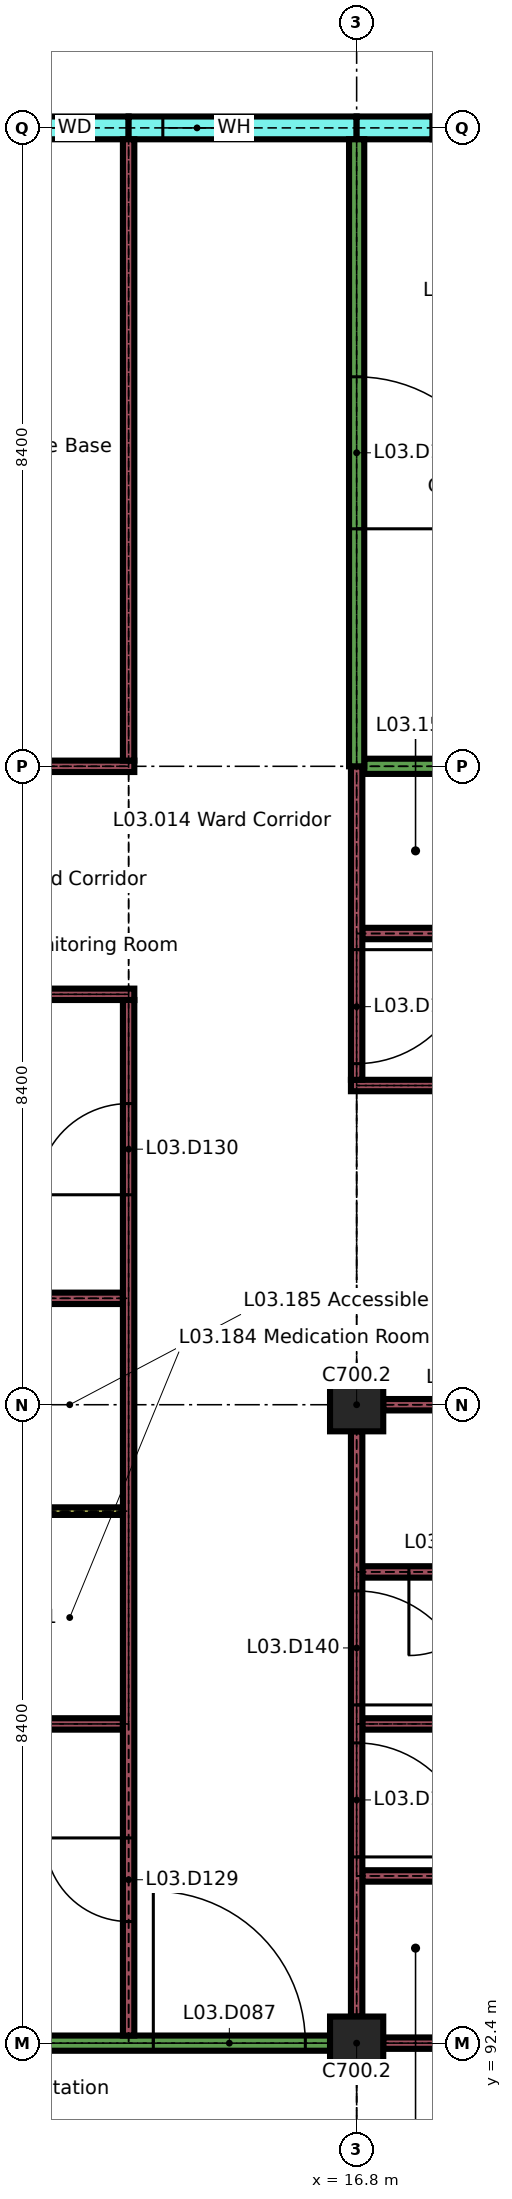
"""IFC4 building model, lengths in metres.
Left out: names, types, materials, properties, quantities, classifications, styles, units other than length and angle.
Written with IfcOpenShell. Run it as: python <this file> out.ifc"""

import sys

from ifc_helpers import new_model, si_unit, direction, frame, frame_2d, origin, origin_2d, place, context, subcontext, project, spatial, rectangle, extrude, element, fill, save


model = new_model("IFC4")
c1 = context("Model", 3, precision=1e-05, world=origin(), true_north=direction((0.0, 1.0)))
c2 = subcontext(c1, "Body", "Model", "MODEL_VIEW")
j1 = project(units=[si_unit("LENGTHUNIT", "METRE"), si_unit("PLANEANGLEUNIT", "RADIAN")], contexts=[c1])
p1 = place(None, origin())
s1 = spatial("IfcSite", under=j1, at=p1, CompositionType="ELEMENT")
p2 = place(p1, origin())
s2 = spatial("IfcBuilding", under=s1, at=p2, CompositionType="ELEMENT")
p3 = place(p2, frame((0.0, 0.0, 15.3)))
s3 = spatial("IfcBuildingStorey", under=s2, at=p3, CompositionType="ELEMENT", Elevation=15.3)
for number, where, z_axis, x_axis in (
    (1, (16.8, 92.4, 0.0), (0.0, 0.0, 1.0), (1.0, 0.0, 0.0)),
    (2, (16.8, 100.8, 0.0), (0.0, 0.0, 1.0), (1.0, 0.0, 0.0)),
):
    element("IfcColumn", number, at=place(p3, frame(where, z_axis=z_axis, x_axis=x_axis)), inside=s3, PredefinedType="COLUMN", context=c2, shape_type="SweptSolid", body=[
        extrude(rectangle(XDim=0.7, YDim=0.7, at=origin_2d()), origin(), (0.0, 0.0, 1.0), 3.26),
    ])
p4 = place(p3, frame((11.4, 117.6, 0.0), z_axis=(0.0, 0.0, 1.0), x_axis=(1.0, 0.0, 0.0)))
e3 = element("IfcWall", 3, at=p4, inside=s3, PredefinedType="SOLIDWALL", context=c2, shape_type="SweptSolid", body=[
    extrude(rectangle(XDim=2.4, YDim=0.3, at=frame_2d((1.2, 0.0))), origin(), (0.0, 0.0, 1.0), 3.26),
])
p5 = place(p4, frame((0.6, 0.0, 0.9)))
e4 = element("IfcOpeningElement", 4, at=p5, cuts=e3, PredefinedType="OPENING", context=c2, shape_type="SweptSolid", body=[
    extrude(rectangle(XDim=1.2, YDim=1.5, at=frame_2d((0.6, 0.75))), frame((0.0, 0.16, 0.0), z_axis=(0.0, -1.0, 0.0), x_axis=(1.0, 0.0, 0.0)), (0.0, 0.0, 1.0), 0.32),
])
p6 = place(p3, frame((13.8, 117.6, 0.0), z_axis=(0.0, 0.0, 1.0), x_axis=(1.0, 0.0, 0.0)))
e5 = element("IfcWall", 5, at=p6, inside=s3, PredefinedType="SOLIDWALL", context=c2, shape_type="SweptSolid", body=[
    extrude(rectangle(XDim=3.0, YDim=0.3, at=frame_2d((1.5, 0.0))), origin(), (0.0, 0.0, 1.0), 3.26),
])
p7 = place(p6, frame((0.45, 0.0, 0.9)))
e6 = element("IfcOpeningElement", 6, at=p7, cuts=e5, PredefinedType="OPENING", context=c2, shape_type="SweptSolid", body=[
    extrude(rectangle(XDim=0.9, YDim=1.5, at=frame_2d((0.45, 0.75))), frame((0.0, 0.16, 0.0), z_axis=(0.0, -1.0, 0.0), x_axis=(1.0, 0.0, 0.0)), (0.0, 0.0, 1.0), 0.32),
])
p8 = place(p3, frame((16.8, 117.6, 0.0), z_axis=(0.0, 0.0, 1.0), x_axis=(1.0, 0.0, 0.0)))
e7 = element("IfcWall", 7, at=p8, inside=s3, PredefinedType="SOLIDWALL", context=c2, shape_type="SweptSolid", body=[
    extrude(rectangle(XDim=1.0, YDim=0.3, at=frame_2d((0.5, 0.0))), origin(), (0.0, 0.0, 1.0), 3.26),
])
p9 = place(p3, frame((17.8, 117.6, 0.0), z_axis=(0.0, 0.0, 1.0), x_axis=(1.0, 0.0, 0.0)))
e8 = element("IfcWall", 8, at=p9, inside=s3, PredefinedType="SOLIDWALL", context=c2, shape_type="SweptSolid", body=[
    extrude(rectangle(XDim=2.8, YDim=0.3, at=frame_2d((1.4, 0.0))), origin(), (0.0, 0.0, 1.0), 0.6),
])
p10 = place(p3, frame((8.75, 92.4, 0.0), z_axis=(0.0, 0.0, 1.0), x_axis=(1.0, 0.0, 0.0)))
e9 = element("IfcWall", 9, at=p10, inside=s3, PredefinedType="PARTITIONING", context=c2, shape_type="SweptSolid", body=[
    extrude(rectangle(XDim=7.7, YDim=0.2, at=frame_2d((3.85, 0.0))), origin(), (0.0, 0.0, 1.0), 3.26),
])
p11 = place(p10, frame((0.325, 0.0, 0.0)))
e10 = element("IfcOpeningElement", 10, at=p11, cuts=e9, PredefinedType="OPENING", context=c2, shape_type="SweptSolid", body=[
    extrude(rectangle(XDim=2.0, YDim=2.4, at=frame_2d((1.0, 1.2))), frame((0.0, 0.11, 0.0), z_axis=(0.0, -1.0, 0.0), x_axis=(1.0, 0.0, 0.0)), (0.0, 0.0, 1.0), 0.22),
])
p12 = place(p10, frame((5.375, 0.0, 0.0)))
e11 = element("IfcOpeningElement", 11, at=p12, cuts=e9, PredefinedType="OPENING", context=c2, shape_type="SweptSolid", body=[
    extrude(rectangle(XDim=2.0, YDim=2.4, at=frame_2d((1.0, 1.2))), frame((0.0, 0.11, 0.0), z_axis=(0.0, -1.0, 0.0), x_axis=(1.0, 0.0, 0.0)), (0.0, 0.0, 1.0), 0.22),
])
p13 = place(p3, frame((17.15, 92.4, 0.0), z_axis=(0.0, 0.0, 1.0), x_axis=(1.0, 0.0, 0.0)))
e12 = element("IfcWall", 12, at=p13, inside=s3, PredefinedType="PARTITIONING", context=c2, shape_type="SweptSolid", body=[
    extrude(rectangle(XDim=7.7, YDim=0.15, at=frame_2d((3.85, 0.0))), origin(), (0.0, 0.0, 1.0), 3.26),
])
p14 = place(p3, frame((16.875, 94.6, 0.0), z_axis=(0.0, 0.0, 1.0), x_axis=(1.0, 0.0, 0.0)))
e13 = element("IfcWall", 13, at=p14, inside=s3, PredefinedType="PARTITIONING", context=c2, shape_type="SweptSolid", body=[
    extrude(rectangle(XDim=2.4, YDim=0.15, at=frame_2d((1.2, 0.0))), origin(), (0.0, 0.0, 1.0), 3.26),
])
p15 = place(p3, frame((11.475, 96.6, 0.0), z_axis=(0.0, 0.0, 1.0), x_axis=(1.0, 0.0, 0.0)))
e14 = element("IfcWall", 14, at=p15, inside=s3, PredefinedType="PARTITIONING", context=c2, shape_type="SweptSolid", body=[
    extrude(rectangle(XDim=2.25, YDim=0.15, at=frame_2d((1.125, 0.0))), origin(), (0.0, 0.0, 1.0), 3.26),
])
p16 = place(p3, frame((16.875, 96.6, 0.0), z_axis=(0.0, 0.0, 1.0), x_axis=(1.0, 0.0, 0.0)))
e15 = element("IfcWall", 15, at=p16, inside=s3, PredefinedType="PARTITIONING", context=c2, shape_type="SweptSolid", body=[
    extrude(rectangle(XDim=8.175, YDim=0.15, at=frame_2d((4.087, 0.0))), origin(), (0.0, 0.0, 1.0), 3.26),
])
p17 = place(p3, frame((16.875, 98.6, 0.0), z_axis=(0.0, 0.0, 1.0), x_axis=(1.0, 0.0, 0.0)))
e16 = element("IfcWall", 16, at=p17, inside=s3, PredefinedType="PARTITIONING", context=c2, shape_type="SweptSolid", body=[
    extrude(rectangle(XDim=2.4, YDim=0.15, at=frame_2d((1.2, 0.0))), origin(), (0.0, 0.0, 1.0), 3.26),
])
p18 = place(p17, frame((0.613, 0.0, 0.0)))
e17 = element("IfcOpeningElement", 17, at=p18, cuts=e16, PredefinedType="OPENING", context=c2, shape_type="SweptSolid", body=[
    extrude(rectangle(XDim=1.1, YDim=2.1, at=frame_2d((0.55, 1.05))), frame((0.0, 0.085, 0.0), z_axis=(0.0, -1.0, 0.0), x_axis=(1.0, 0.0, 0.0)), (0.0, 0.0, 1.0), 0.17),
])
p19 = place(p3, frame((11.475, 99.4, 0.0), z_axis=(0.0, 0.0, 1.0), x_axis=(1.0, 0.0, 0.0)))
e18 = element("IfcWall", 18, at=p19, inside=s3, PredefinedType="PARTITIONING", context=c2, shape_type="SweptSolid", body=[
    extrude(rectangle(XDim=2.25, YDim=0.1, at=frame_2d((1.125, 0.0))), origin(), (0.0, 0.0, 1.0), 3.26),
])
p20 = place(p3, frame((17.15, 100.8, 0.0), z_axis=(0.0, 0.0, 1.0), x_axis=(1.0, 0.0, 0.0)))
e19 = element("IfcWall", 19, at=p20, inside=s3, PredefinedType="PARTITIONING", context=c2, shape_type="SweptSolid", body=[
    extrude(rectangle(XDim=7.7, YDim=0.15, at=frame_2d((3.85, 0.0))), origin(), (0.0, 0.0, 1.0), 3.26),
])
p21 = place(p3, frame((11.475, 102.2, 0.0), z_axis=(0.0, 0.0, 1.0), x_axis=(1.0, 0.0, 0.0)))
e20 = element("IfcWall", 20, at=p21, inside=s3, PredefinedType="PARTITIONING", context=c2, shape_type="SweptSolid", body=[
    extrude(rectangle(XDim=2.25, YDim=0.15, at=frame_2d((1.125, 0.0))), origin(), (0.0, 0.0, 1.0), 3.26),
])
p22 = place(p3, frame((16.725, 105.0, 0.0), z_axis=(0.0, 0.0, 1.0), x_axis=(1.0, 0.0, 0.0)))
e21 = element("IfcWall", 21, at=p22, inside=s3, PredefinedType="PARTITIONING", context=c2, shape_type="SweptSolid", body=[
    extrude(rectangle(XDim=8.325, YDim=0.15, at=frame_2d((4.163, 0.0))), origin(), (0.0, 0.0, 1.0), 3.26),
])
p23 = place(p3, frame((11.325, 106.2, 0.0), z_axis=(0.0, 0.0, 1.0), x_axis=(1.0, 0.0, 0.0)))
e22 = element("IfcWall", 22, at=p23, inside=s3, PredefinedType="PARTITIONING", context=c2, shape_type="SweptSolid", body=[
    extrude(rectangle(XDim=2.55, YDim=0.15, at=frame_2d((1.275, 0.0))), origin(), (0.0, 0.0, 1.0), 3.26),
])
p24 = place(p3, frame((16.875, 107.0, 0.0), z_axis=(0.0, 0.0, 1.0), x_axis=(1.0, 0.0, 0.0)))
e23 = element("IfcWall", 23, at=p24, inside=s3, PredefinedType="PARTITIONING", context=c2, shape_type="SweptSolid", body=[
    extrude(rectangle(XDim=2.4, YDim=0.15, at=frame_2d((1.2, 0.0))), origin(), (0.0, 0.0, 1.0), 3.26),
])
p25 = place(p3, frame((11.4, 109.2, 0.0), z_axis=(0.0, 0.0, 1.0), x_axis=(1.0, 0.0, 0.0)))
e24 = element("IfcWall", 24, at=p25, inside=s3, PredefinedType="PARTITIONING", context=c2, shape_type="SweptSolid", body=[
    extrude(rectangle(XDim=2.475, YDim=0.15, at=frame_2d((1.238, 0.0))), origin(), (0.0, 0.0, 1.0), 3.26),
])
p26 = place(p3, frame((16.9, 109.2, 0.0), z_axis=(0.0, 0.0, 1.0), x_axis=(1.0, 0.0, 0.0)))
e25 = element("IfcWall", 25, at=p26, inside=s3, PredefinedType="PARTITIONING", context=c2, shape_type="SweptSolid", body=[
    extrude(rectangle(XDim=4.7, YDim=0.2, at=frame_2d((2.35, 0.0))), origin(), (0.0, 0.0, 1.0), 3.26),
])
p27 = place(p3, frame((13.8, 92.5, 0.0), z_axis=(0.0, 0.0, 1.0), x_axis=(0.0, 1.0, 0.0)))
e26 = element("IfcWall", 26, at=p27, inside=s3, PredefinedType="PARTITIONING", context=c2, shape_type="SweptSolid", body=[
    extrude(rectangle(XDim=13.625, YDim=0.15, at=frame_2d((6.812, 0.0))), origin(), (0.0, 0.0, 1.0), 3.26),
])
p28 = place(p27, frame((1.5, 0.0, 0.0)))
e27 = element("IfcOpeningElement", 27, at=p28, cuts=e26, PredefinedType="OPENING", context=c2, shape_type="SweptSolid", body=[
    extrude(rectangle(XDim=1.1, YDim=2.1, at=frame_2d((0.55, 1.05))), frame((0.0, 0.085, 0.0), z_axis=(0.0, -1.0, 0.0), x_axis=(1.0, 0.0, 0.0)), (0.0, 0.0, 1.0), 0.17),
])
p29 = place(p27, frame((11.062, 0.0, 0.0)))
e28 = element("IfcOpeningElement", 28, at=p29, cuts=e26, PredefinedType="OPENING", context=c2, shape_type="SweptSolid", body=[
    extrude(rectangle(XDim=1.2, YDim=2.1, at=frame_2d((0.6, 1.05))), frame((0.0, 0.085, 0.0), z_axis=(0.0, -1.0, 0.0), x_axis=(1.0, 0.0, 0.0)), (0.0, 0.0, 1.0), 0.17),
])
p30 = place(p3, frame((13.8, 109.275, 0.0), z_axis=(0.0, 0.0, 1.0), x_axis=(0.0, 1.0, 0.0)))
e29 = element("IfcWall", 29, at=p30, inside=s3, PredefinedType="PARTITIONING", context=c2, shape_type="SweptSolid", body=[
    extrude(rectangle(XDim=8.175, YDim=0.15, at=frame_2d((4.087, 0.0))), origin(), (0.0, 0.0, 1.0), 3.26),
])
p31 = place(p3, frame((16.8, 92.75, 0.0), z_axis=(0.0, 0.0, 1.0), x_axis=(0.0, 1.0, 0.0)))
e30 = element("IfcWall", 30, at=p31, inside=s3, PredefinedType="PARTITIONING", context=c2, shape_type="SweptSolid", body=[
    extrude(rectangle(XDim=7.7, YDim=0.15, at=frame_2d((3.85, 0.0))), origin(), (0.0, 0.0, 1.0), 3.26),
])
p32 = place(p31, frame((2.1, 0.0, 0.0)))
e31 = element("IfcOpeningElement", 31, at=p32, cuts=e30, PredefinedType="OPENING", context=c2, shape_type="SweptSolid", body=[
    extrude(rectangle(XDim=1.5, YDim=2.4, at=frame_2d((0.75, 1.2))), frame((0.0, 0.085, 0.0), z_axis=(0.0, -1.0, 0.0), x_axis=(1.0, 0.0, 0.0)), (0.0, 0.0, 1.0), 0.17),
])
p33 = place(p31, frame((4.1, 0.0, 0.0)))
e32 = element("IfcOpeningElement", 32, at=p33, cuts=e30, PredefinedType="OPENING", context=c2, shape_type="SweptSolid", body=[
    extrude(rectangle(XDim=1.5, YDim=2.4, at=frame_2d((0.75, 1.2))), frame((0.0, 0.085, 0.0), z_axis=(0.0, -1.0, 0.0), x_axis=(1.0, 0.0, 0.0)), (0.0, 0.0, 1.0), 0.17),
])
p34 = place(p3, frame((16.8, 105.075, 0.0), z_axis=(0.0, 0.0, 1.0), x_axis=(0.0, 1.0, 0.0)))
e33 = element("IfcWall", 33, at=p34, inside=s3, PredefinedType="PARTITIONING", context=c2, shape_type="SweptSolid", body=[
    extrude(rectangle(XDim=4.125, YDim=0.15, at=frame_2d((2.062, 0.0))), origin(), (0.0, 0.0, 1.0), 3.26),
])
p35 = place(p34, frame((0.212, 0.0, 0.0)))
e34 = element("IfcOpeningElement", 34, at=p35, cuts=e33, PredefinedType="OPENING", context=c2, shape_type="SweptSolid", body=[
    extrude(rectangle(XDim=1.5, YDim=2.4, at=frame_2d((0.75, 1.2))), frame((0.0, 0.085, 0.0), z_axis=(0.0, -1.0, 0.0), x_axis=(1.0, 0.0, 0.0)), (0.0, 0.0, 1.0), 0.17),
])
p36 = place(p3, frame((16.8, 109.2, 0.0), z_axis=(0.0, 0.0, 1.0), x_axis=(0.0, 1.0, 0.0)))
e35 = element("IfcWall", 35, at=p36, inside=s3, PredefinedType="PARTITIONING", context=c2, shape_type="SweptSolid", body=[
    extrude(rectangle(XDim=8.25, YDim=0.2, at=frame_2d((4.125, 0.0))), origin(), (0.0, 0.0, 1.0), 3.26),
])
p37 = place(p36, frame((3.125, 0.0, 0.0)))
e36 = element("IfcOpeningElement", 36, at=p37, cuts=e35, PredefinedType="OPENING", context=c2, shape_type="SweptSolid", body=[
    extrude(rectangle(XDim=2.0, YDim=2.4, at=frame_2d((1.0, 1.2))), frame((0.0, 0.11, 0.0), z_axis=(0.0, -1.0, 0.0), x_axis=(1.0, 0.0, 0.0)), (0.0, 0.0, 1.0), 0.22),
])
p38 = place(p5, origin())
e37 = element("IfcWindow", 37, at=p38, inside=s3, PartitioningType="SINGLE_PANEL", PredefinedType="WINDOW", context=c2, shape_type="SweptSolid", body=[
    extrude(rectangle(XDim=1.2, YDim=1.5, at=frame_2d((0.6, 0.75))), frame((0.0, 0.03, 0.0), z_axis=(0.0, -1.0, 0.0), x_axis=(1.0, 0.0, 0.0)), (0.0, 0.0, 1.0), 0.06),
])
fill(e4, e37)
p39 = place(p7, origin())
e38 = element("IfcWindow", 38, at=p39, inside=s3, PartitioningType="SINGLE_PANEL", PredefinedType="WINDOW", context=c2, shape_type="SweptSolid", body=[
    extrude(rectangle(XDim=0.9, YDim=1.5, at=frame_2d((0.45, 0.75))), frame((0.0, 0.03, 0.0), z_axis=(0.0, -1.0, 0.0), x_axis=(1.0, 0.0, 0.0)), (0.0, 0.0, 1.0), 0.06),
])
fill(e6, e38)
p40 = place(p12, origin())
e39 = element("IfcDoor", 39, at=p40, inside=s3, OperationType="SINGLE_SWING_RIGHT", PredefinedType="DOOR", context=c2, shape_type="SweptSolid", body=[
    extrude(rectangle(XDim=2.0, YDim=2.4, at=frame_2d((1.0, 1.2))), frame((0.0, 0.03, 0.0), z_axis=(0.0, -1.0, 0.0), x_axis=(1.0, 0.0, 0.0)), (0.0, 0.0, 1.0), 0.06),
])
fill(e11, e39)
p41 = place(p18, origin())
e40 = element("IfcDoor", 40, at=p41, inside=s3, OperationType="SINGLE_SWING_LEFT", PredefinedType="DOOR", context=c2, shape_type="SweptSolid", body=[
    extrude(rectangle(XDim=1.1, YDim=2.1, at=frame_2d((0.55, 1.05))), frame((0.0, 0.025, 0.0), z_axis=(0.0, -1.0, 0.0), x_axis=(1.0, 0.0, 0.0)), (0.0, 0.0, 1.0), 0.05),
])
fill(e17, e40)
p42 = place(p28, origin())
e41 = element("IfcDoor", 41, at=p42, inside=s3, OperationType="SINGLE_SWING_LEFT", PredefinedType="DOOR", context=c2, shape_type="SweptSolid", body=[
    extrude(rectangle(XDim=1.1, YDim=2.1, at=frame_2d((0.55, 1.05))), frame((0.0, 0.025, 0.0), z_axis=(0.0, -1.0, 0.0), x_axis=(1.0, 0.0, 0.0)), (0.0, 0.0, 1.0), 0.05),
])
fill(e27, e41)
p43 = place(p29, origin())
e42 = element("IfcDoor", 42, at=p43, inside=s3, OperationType="SINGLE_SWING_RIGHT", PredefinedType="DOOR", context=c2, shape_type="SweptSolid", body=[
    extrude(rectangle(XDim=1.2, YDim=2.1, at=frame_2d((0.6, 1.05))), frame((0.0, 0.025, 0.0), z_axis=(0.0, -1.0, 0.0), x_axis=(1.0, 0.0, 0.0)), (0.0, 0.0, 1.0), 0.05),
])
fill(e28, e42)
p44 = place(p32, origin())
e43 = element("IfcDoor", 43, at=p44, inside=s3, OperationType="SINGLE_SWING_LEFT", PredefinedType="DOOR", context=c2, shape_type="SweptSolid", body=[
    extrude(rectangle(XDim=1.5, YDim=2.4, at=frame_2d((0.75, 1.2))), frame((0.0, 0.03, 0.0), z_axis=(0.0, -1.0, 0.0), x_axis=(1.0, 0.0, 0.0)), (0.0, 0.0, 1.0), 0.06),
])
fill(e31, e43)
p45 = place(p33, origin())
e44 = element("IfcDoor", 44, at=p45, inside=s3, OperationType="SINGLE_SWING_LEFT", PredefinedType="DOOR", context=c2, shape_type="SweptSolid", body=[
    extrude(rectangle(XDim=1.5, YDim=2.4, at=frame_2d((0.75, 1.2))), frame((0.0, 0.03, 0.0), z_axis=(0.0, -1.0, 0.0), x_axis=(1.0, 0.0, 0.0)), (0.0, 0.0, 1.0), 0.06),
])
fill(e32, e44)
p46 = place(p35, origin())
e45 = element("IfcDoor", 45, at=p46, inside=s3, OperationType="SINGLE_SWING_RIGHT", PredefinedType="DOOR", context=c2, shape_type="SweptSolid", body=[
    extrude(rectangle(XDim=1.5, YDim=2.4, at=frame_2d((0.75, 1.2))), frame((0.0, 0.03, 0.0), z_axis=(0.0, -1.0, 0.0), x_axis=(1.0, 0.0, 0.0)), (0.0, 0.0, 1.0), 0.06),
])
fill(e34, e45)
p47 = place(p37, origin())
e46 = element("IfcDoor", 46, at=p47, inside=s3, OperationType="SINGLE_SWING_LEFT", PredefinedType="DOOR", context=c2, shape_type="SweptSolid", body=[
    extrude(rectangle(XDim=2.0, YDim=2.4, at=frame_2d((1.0, 1.2))), frame((0.0, 0.03, 0.0), z_axis=(0.0, -1.0, 0.0), x_axis=(1.0, 0.0, 0.0)), (0.0, 0.0, 1.0), 0.06),
])
fill(e36, e46)
save(model, sys.argv[1])
